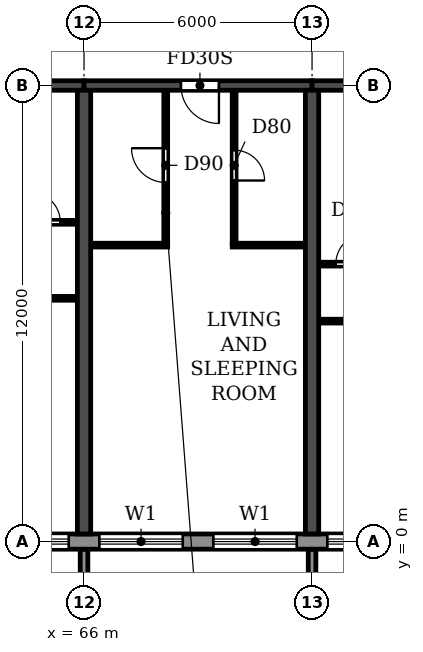
"""IFC4 building model, lengths in metres.
Left out: names, types, materials, properties, quantities, classifications, styles, units other than length and angle.
Written with IfcOpenShell. Run it as: python <this file> out.ifc"""

import sys

from ifc_helpers import new_model, si_unit, direction, frame, frame_2d, origin, place, context, subcontext, project, spatial, polyline, rectangle, outline, extrude, source, transform, mapped, element, fill, save


model = new_model("IFC4")
c1 = context("Model", 3, precision=1e-05, world=origin(), true_north=direction((0.0, 1.0)))
c2 = subcontext(c1, "Body", "Model", "MODEL_VIEW")
j1 = project(units=[si_unit("LENGTHUNIT", "METRE"), si_unit("PLANEANGLEUNIT", "RADIAN")], contexts=[c1])
p1 = place(None, origin())
s1 = spatial("IfcSite", under=j1, at=p1, CompositionType="ELEMENT")
p2 = place(p1, origin())
s2 = spatial("IfcBuilding", under=s1, at=p2, CompositionType="ELEMENT")
p3 = place(p2, frame((0.0, 0.0, 76.2)))
s3 = spatial("IfcBuildingStorey", under=s2, at=p3, CompositionType="ELEMENT", Elevation=76.2)
for number, where, z_axis, x_axis in (
    (1, (66.0, 0.2, 0.0), (0.0, 0.0, 1.0), (0.0, 1.0, 0.0)),
    (2, (72.0, 0.2, 0.0), (0.0, 0.0, 1.0), (0.0, 1.0, 0.0)),
):
    element("IfcWall", number, at=place(p3, frame(where, z_axis=z_axis, x_axis=x_axis)), inside=s3, PredefinedType="SHEAR", context=c2, shape_type="SweptSolid", body=[
        extrude(rectangle(XDim=11.675, YDim=0.35, at=frame_2d((5.837, 0.0))), origin(), (0.0, 0.0, 1.0), 3.06),
    ])
p4 = place(p3, frame((60.0, 12.0, 0.0), z_axis=(0.0, 0.0, 1.0), x_axis=(1.0, 0.0, 0.0)))
e3 = element("IfcWall", 3, at=p4, inside=s3, PredefinedType="SHEAR", context=c2, shape_type="SweptSolid", body=[
    extrude(rectangle(XDim=6.0, YDim=0.25, at=frame_2d((3.0, 0.0))), origin(), (0.0, 0.0, 1.0), 2.46),
])
p5 = place(p4, frame((2.55, 0.0, 0.0)))
e4 = element("IfcOpeningElement", 4, at=p5, cuts=e3, PredefinedType="OPENING", context=c2, shape_type="SweptSolid", body=[
    extrude(rectangle(XDim=1.0, YDim=2.1, at=frame_2d((0.5, 1.05))), frame((0.0, 0.135, 0.0), z_axis=(0.0, -1.0, 0.0), x_axis=(1.0, 0.0, 0.0)), (0.0, 0.0, 1.0), 0.27),
])
p6 = place(p3, frame((66.0, 12.0, 0.0), z_axis=(0.0, 0.0, 1.0), x_axis=(1.0, 0.0, 0.0)))
e5 = element("IfcWall", 5, at=p6, inside=s3, PredefinedType="SHEAR", context=c2, shape_type="SweptSolid", body=[
    extrude(rectangle(XDim=6.0, YDim=0.25, at=frame_2d((3.0, 0.0))), origin(), (0.0, 0.0, 1.0), 2.46),
])
p7 = place(p6, frame((2.55, 0.0, 0.0)))
e6 = element("IfcOpeningElement", 6, at=p7, cuts=e5, PredefinedType="OPENING", context=c2, shape_type="SweptSolid", body=[
    extrude(rectangle(XDim=1.0, YDim=2.1, at=frame_2d((0.5, 1.05))), frame((0.0, 0.135, 0.0), z_axis=(0.0, -1.0, 0.0), x_axis=(1.0, 0.0, 0.0)), (0.0, 0.0, 1.0), 0.27),
])
p8 = place(p3, frame((72.0, 12.0, 0.0), z_axis=(0.0, 0.0, 1.0), x_axis=(1.0, 0.0, 0.0)))
e7 = element("IfcWall", 7, at=p8, inside=s3, PredefinedType="SHEAR", context=c2, shape_type="SweptSolid", body=[
    extrude(rectangle(XDim=6.0, YDim=0.25, at=frame_2d((3.0, 0.0))), origin(), (0.0, 0.0, 1.0), 2.46),
])
p9 = place(p8, frame((2.45, 0.0, 0.0)))
e8 = element("IfcOpeningElement", 8, at=p9, cuts=e7, PredefinedType="OPENING", context=c2, shape_type="SweptSolid", body=[
    extrude(rectangle(XDim=1.0, YDim=2.1, at=frame_2d((0.5, 1.05))), frame((0.0, 0.135, 0.0), z_axis=(0.0, -1.0, 0.0), x_axis=(1.0, 0.0, 0.0)), (0.0, 0.0, 1.0), 0.27),
])
p10 = place(p3, frame((10.683, 0.0, 0.0), z_axis=(0.0, 0.0, 1.0), x_axis=(1.0, 0.0, 0.0)))
e9 = element("IfcWall", 9, at=p10, inside=s3, PredefinedType="STANDARD", context=c2, shape_type="SweptSolid", body=[
    extrude(rectangle(XDim=80.634, YDim=0.4, at=frame_2d((40.317, 0.0))), origin(), (0.0, 0.0, 1.0), 3.06),
])
p11 = place(p10, frame((1.717, 0.0, 0.9)))
e10 = element("IfcOpeningElement", 10, at=p11, cuts=e9, PredefinedType="OPENING", context=c2, shape_type="SweptSolid", body=[
    extrude(rectangle(XDim=2.2, YDim=1.5, at=frame_2d((1.1, 0.75))), frame((0.0, 0.21, 0.0), z_axis=(0.0, -1.0, 0.0), x_axis=(1.0, 0.0, 0.0)), (0.0, 0.0, 1.0), 0.42),
])
p12 = place(p10, frame((4.917, 0.0, 0.0)))
e11 = element("IfcOpeningElement", 11, at=p12, cuts=e9, PredefinedType="OPENING", context=c2, shape_type="SweptSolid", body=[
    extrude(rectangle(XDim=1.8, YDim=2.4, at=frame_2d((0.9, 1.2))), frame((0.0, 0.21, 0.0), z_axis=(0.0, -1.0, 0.0), x_axis=(1.0, 0.0, 0.0)), (0.0, 0.0, 1.0), 0.42),
])
p13 = place(p10, frame((7.717, 0.0, 0.9)))
e12 = element("IfcOpeningElement", 12, at=p13, cuts=e9, PredefinedType="OPENING", context=c2, shape_type="SweptSolid", body=[
    extrude(rectangle(XDim=2.2, YDim=1.5, at=frame_2d((1.1, 0.75))), frame((0.0, 0.21, 0.0), z_axis=(0.0, -1.0, 0.0), x_axis=(1.0, 0.0, 0.0)), (0.0, 0.0, 1.0), 0.42),
])
p14 = place(p10, frame((10.717, 0.0, 0.9)))
e13 = element("IfcOpeningElement", 13, at=p14, cuts=e9, PredefinedType="OPENING", context=c2, shape_type="SweptSolid", body=[
    extrude(rectangle(XDim=2.2, YDim=1.5, at=frame_2d((1.1, 0.75))), frame((0.0, 0.21, 0.0), z_axis=(0.0, -1.0, 0.0), x_axis=(1.0, 0.0, 0.0)), (0.0, 0.0, 1.0), 0.42),
])
p15 = place(p10, frame((13.717, 0.0, 0.9)))
e14 = element("IfcOpeningElement", 14, at=p15, cuts=e9, PredefinedType="OPENING", context=c2, shape_type="SweptSolid", body=[
    extrude(rectangle(XDim=2.2, YDim=1.5, at=frame_2d((1.1, 0.75))), frame((0.0, 0.21, 0.0), z_axis=(0.0, -1.0, 0.0), x_axis=(1.0, 0.0, 0.0)), (0.0, 0.0, 1.0), 0.42),
])
p16 = place(p10, frame((16.917, 0.0, 0.0)))
e15 = element("IfcOpeningElement", 15, at=p16, cuts=e9, PredefinedType="OPENING", context=c2, shape_type="SweptSolid", body=[
    extrude(rectangle(XDim=1.8, YDim=2.4, at=frame_2d((0.9, 1.2))), frame((0.0, 0.21, 0.0), z_axis=(0.0, -1.0, 0.0), x_axis=(1.0, 0.0, 0.0)), (0.0, 0.0, 1.0), 0.42),
])
p17 = place(p10, frame((19.717, 0.0, 0.9)))
e16 = element("IfcOpeningElement", 16, at=p17, cuts=e9, PredefinedType="OPENING", context=c2, shape_type="SweptSolid", body=[
    extrude(rectangle(XDim=2.2, YDim=1.5, at=frame_2d((1.1, 0.75))), frame((0.0, 0.21, 0.0), z_axis=(0.0, -1.0, 0.0), x_axis=(1.0, 0.0, 0.0)), (0.0, 0.0, 1.0), 0.42),
])
p18 = place(p10, frame((22.717, 0.0, 0.9)))
e17 = element("IfcOpeningElement", 17, at=p18, cuts=e9, PredefinedType="OPENING", context=c2, shape_type="SweptSolid", body=[
    extrude(rectangle(XDim=2.2, YDim=1.5, at=frame_2d((1.1, 0.75))), frame((0.0, 0.21, 0.0), z_axis=(0.0, -1.0, 0.0), x_axis=(1.0, 0.0, 0.0)), (0.0, 0.0, 1.0), 0.42),
])
p19 = place(p10, frame((25.917, 0.0, 0.0)))
e18 = element("IfcOpeningElement", 18, at=p19, cuts=e9, PredefinedType="OPENING", context=c2, shape_type="SweptSolid", body=[
    extrude(rectangle(XDim=1.8, YDim=2.4, at=frame_2d((0.9, 1.2))), frame((0.0, 0.21, 0.0), z_axis=(0.0, -1.0, 0.0), x_axis=(1.0, 0.0, 0.0)), (0.0, 0.0, 1.0), 0.42),
])
p20 = place(p10, frame((28.717, 0.0, 0.9)))
e19 = element("IfcOpeningElement", 19, at=p20, cuts=e9, PredefinedType="OPENING", context=c2, shape_type="SweptSolid", body=[
    extrude(rectangle(XDim=2.2, YDim=1.5, at=frame_2d((1.1, 0.75))), frame((0.0, 0.21, 0.0), z_axis=(0.0, -1.0, 0.0), x_axis=(1.0, 0.0, 0.0)), (0.0, 0.0, 1.0), 0.42),
])
p21 = place(p10, frame((31.717, 0.0, 0.9)))
e20 = element("IfcOpeningElement", 20, at=p21, cuts=e9, PredefinedType="OPENING", context=c2, shape_type="SweptSolid", body=[
    extrude(rectangle(XDim=2.2, YDim=1.5, at=frame_2d((1.1, 0.75))), frame((0.0, 0.21, 0.0), z_axis=(0.0, -1.0, 0.0), x_axis=(1.0, 0.0, 0.0)), (0.0, 0.0, 1.0), 0.42),
])
p22 = place(p10, frame((34.717, 0.0, 0.9)))
e21 = element("IfcOpeningElement", 21, at=p22, cuts=e9, PredefinedType="OPENING", context=c2, shape_type="SweptSolid", body=[
    extrude(rectangle(XDim=2.2, YDim=1.5, at=frame_2d((1.1, 0.75))), frame((0.0, 0.21, 0.0), z_axis=(0.0, -1.0, 0.0), x_axis=(1.0, 0.0, 0.0)), (0.0, 0.0, 1.0), 0.42),
])
p23 = place(p10, frame((37.917, 0.0, 0.0)))
e22 = element("IfcOpeningElement", 22, at=p23, cuts=e9, PredefinedType="OPENING", context=c2, shape_type="SweptSolid", body=[
    extrude(rectangle(XDim=1.8, YDim=2.4, at=frame_2d((0.9, 1.2))), frame((0.0, 0.21, 0.0), z_axis=(0.0, -1.0, 0.0), x_axis=(1.0, 0.0, 0.0)), (0.0, 0.0, 1.0), 0.42),
])
p24 = place(p10, frame((40.717, 0.0, 0.9)))
e23 = element("IfcOpeningElement", 23, at=p24, cuts=e9, PredefinedType="OPENING", context=c2, shape_type="SweptSolid", body=[
    extrude(rectangle(XDim=2.2, YDim=1.5, at=frame_2d((1.1, 0.75))), frame((0.0, 0.21, 0.0), z_axis=(0.0, -1.0, 0.0), x_axis=(1.0, 0.0, 0.0)), (0.0, 0.0, 1.0), 0.42),
])
p25 = place(p10, frame((43.717, 0.0, 0.9)))
e24 = element("IfcOpeningElement", 24, at=p25, cuts=e9, PredefinedType="OPENING", context=c2, shape_type="SweptSolid", body=[
    extrude(rectangle(XDim=2.2, YDim=1.5, at=frame_2d((1.1, 0.75))), frame((0.0, 0.21, 0.0), z_axis=(0.0, -1.0, 0.0), x_axis=(1.0, 0.0, 0.0)), (0.0, 0.0, 1.0), 0.42),
])
p26 = place(p10, frame((46.717, 0.0, 0.9)))
e25 = element("IfcOpeningElement", 25, at=p26, cuts=e9, PredefinedType="OPENING", context=c2, shape_type="SweptSolid", body=[
    extrude(rectangle(XDim=2.2, YDim=1.5, at=frame_2d((1.1, 0.75))), frame((0.0, 0.21, 0.0), z_axis=(0.0, -1.0, 0.0), x_axis=(1.0, 0.0, 0.0)), (0.0, 0.0, 1.0), 0.42),
])
p27 = place(p10, frame((49.917, 0.0, 0.0)))
e26 = element("IfcOpeningElement", 26, at=p27, cuts=e9, PredefinedType="OPENING", context=c2, shape_type="SweptSolid", body=[
    extrude(rectangle(XDim=1.8, YDim=2.4, at=frame_2d((0.9, 1.2))), frame((0.0, 0.21, 0.0), z_axis=(0.0, -1.0, 0.0), x_axis=(1.0, 0.0, 0.0)), (0.0, 0.0, 1.0), 0.42),
])
p28 = place(p10, frame((52.717, 0.0, 0.9)))
e27 = element("IfcOpeningElement", 27, at=p28, cuts=e9, PredefinedType="OPENING", context=c2, shape_type="SweptSolid", body=[
    extrude(rectangle(XDim=2.2, YDim=1.5, at=frame_2d((1.1, 0.75))), frame((0.0, 0.21, 0.0), z_axis=(0.0, -1.0, 0.0), x_axis=(1.0, 0.0, 0.0)), (0.0, 0.0, 1.0), 0.42),
])
p29 = place(p10, frame((55.717, 0.0, 0.9)))
e28 = element("IfcOpeningElement", 28, at=p29, cuts=e9, PredefinedType="OPENING", context=c2, shape_type="SweptSolid", body=[
    extrude(rectangle(XDim=2.2, YDim=1.5, at=frame_2d((1.1, 0.75))), frame((0.0, 0.21, 0.0), z_axis=(0.0, -1.0, 0.0), x_axis=(1.0, 0.0, 0.0)), (0.0, 0.0, 1.0), 0.42),
])
p30 = place(p10, frame((58.717, 0.0, 0.9)))
e29 = element("IfcOpeningElement", 29, at=p30, cuts=e9, PredefinedType="OPENING", context=c2, shape_type="SweptSolid", body=[
    extrude(rectangle(XDim=2.2, YDim=1.5, at=frame_2d((1.1, 0.75))), frame((0.0, 0.21, 0.0), z_axis=(0.0, -1.0, 0.0), x_axis=(1.0, 0.0, 0.0)), (0.0, 0.0, 1.0), 0.42),
])
p31 = place(p10, frame((61.717, 0.0, 0.9)))
e30 = element("IfcOpeningElement", 30, at=p31, cuts=e9, PredefinedType="OPENING", context=c2, shape_type="SweptSolid", body=[
    extrude(rectangle(XDim=2.2, YDim=1.5, at=frame_2d((1.1, 0.75))), frame((0.0, 0.21, 0.0), z_axis=(0.0, -1.0, 0.0), x_axis=(1.0, 0.0, 0.0)), (0.0, 0.0, 1.0), 0.42),
])
p32 = place(p10, frame((64.917, 0.0, 0.0)))
e31 = element("IfcOpeningElement", 31, at=p32, cuts=e9, PredefinedType="OPENING", context=c2, shape_type="SweptSolid", body=[
    extrude(rectangle(XDim=1.8, YDim=2.4, at=frame_2d((0.9, 1.2))), frame((0.0, 0.21, 0.0), z_axis=(0.0, -1.0, 0.0), x_axis=(1.0, 0.0, 0.0)), (0.0, 0.0, 1.0), 0.42),
])
p33 = place(p10, frame((67.717, 0.0, 0.9)))
e32 = element("IfcOpeningElement", 32, at=p33, cuts=e9, PredefinedType="OPENING", context=c2, shape_type="SweptSolid", body=[
    extrude(rectangle(XDim=2.2, YDim=1.5, at=frame_2d((1.1, 0.75))), frame((0.0, 0.21, 0.0), z_axis=(0.0, -1.0, 0.0), x_axis=(1.0, 0.0, 0.0)), (0.0, 0.0, 1.0), 0.42),
])
p34 = place(p10, frame((70.717, 0.0, 0.9)))
e33 = element("IfcOpeningElement", 33, at=p34, cuts=e9, PredefinedType="OPENING", context=c2, shape_type="SweptSolid", body=[
    extrude(rectangle(XDim=2.2, YDim=1.5, at=frame_2d((1.1, 0.75))), frame((0.0, 0.21, 0.0), z_axis=(0.0, -1.0, 0.0), x_axis=(1.0, 0.0, 0.0)), (0.0, 0.0, 1.0), 0.42),
])
p35 = place(p10, frame((73.917, 0.0, 0.0)))
e34 = element("IfcOpeningElement", 34, at=p35, cuts=e9, PredefinedType="OPENING", context=c2, shape_type="SweptSolid", body=[
    extrude(rectangle(XDim=1.8, YDim=2.4, at=frame_2d((0.9, 1.2))), frame((0.0, 0.21, 0.0), z_axis=(0.0, -1.0, 0.0), x_axis=(1.0, 0.0, 0.0)), (0.0, 0.0, 1.0), 0.42),
])
p36 = place(p10, frame((76.717, 0.0, 0.9)))
e35 = element("IfcOpeningElement", 35, at=p36, cuts=e9, PredefinedType="OPENING", context=c2, shape_type="SweptSolid", body=[
    extrude(rectangle(XDim=2.2, YDim=1.5, at=frame_2d((1.1, 0.75))), frame((0.0, 0.21, 0.0), z_axis=(0.0, -1.0, 0.0), x_axis=(1.0, 0.0, 0.0)), (0.0, 0.0, 1.0), 0.42),
])
m1 = source(origin(), c2, "Body", "SweptSolid", [
    extrude(outline(polyline([(0.0, 0.0), (0.2, 0.0), (0.2, 1.65), (0.0, 1.65), (0.0, 0.0)])), origin(), (0.0, 0.0, 1.0), 3.1),
])
for number, where in (
    (36, (65.9, -1.85, 0.0)),
    (37, (71.9, -1.85, 0.0)),
):
    element("IfcWall", number, at=place(p3, frame(where)), inside=s3, PredefinedType="STANDARD", context=c2, shape_type="MappedRepresentation", body=[
        mapped(m1, transform((0.0, 0.0, 0.0))),
    ])
p37 = place(p3, frame((72.185, 5.8, 0.0), z_axis=(0.0, 0.0, 1.0), x_axis=(1.0, 0.0, 0.0)))
e38 = element("IfcWall", 38, at=p37, inside=s3, PredefinedType="PARTITIONING", context=c2, shape_type="SweptSolid", body=[
    extrude(rectangle(XDim=2.865, YDim=0.1, at=frame_2d((1.433, 0.0))), origin(), (0.0, 0.0, 1.0), 3.06),
])
p38 = place(p37, frame((1.415, 0.0, 0.0)))
e39 = element("IfcOpeningElement", 39, at=p38, cuts=e38, PredefinedType="OPENING", context=c2, shape_type="SweptSolid", body=[
    extrude(rectangle(XDim=0.9, YDim=2.1, at=frame_2d((0.45, 1.05))), frame((0.0, 0.06, 0.0), z_axis=(0.0, -1.0, 0.0), x_axis=(1.0, 0.0, 0.0)), (0.0, 0.0, 1.0), 0.12),
])
p39 = place(p3, frame((62.95, 6.4, 0.0), z_axis=(0.0, 0.0, 1.0), x_axis=(1.0, 0.0, 0.0)))
e40 = element("IfcWall", 40, at=p39, inside=s3, PredefinedType="PARTITIONING", context=c2, shape_type="SweptSolid", body=[
    extrude(rectangle(XDim=2.865, YDim=0.1, at=frame_2d((1.433, 0.0))), origin(), (0.0, 0.0, 1.0), 3.06),
])
p40 = place(p39, frame((0.55, 0.0, 0.0)))
e41 = element("IfcOpeningElement", 41, at=p40, cuts=e40, PredefinedType="OPENING", context=c2, shape_type="SweptSolid", body=[
    extrude(rectangle(XDim=0.9, YDim=2.1, at=frame_2d((0.45, 1.05))), frame((0.0, 0.06, 0.0), z_axis=(0.0, -1.0, 0.0), x_axis=(1.0, 0.0, 0.0)), (0.0, 0.0, 1.0), 0.12),
])
p41 = place(p3, frame((72.185, 7.3, 0.0), z_axis=(0.0, 0.0, 1.0), x_axis=(1.0, 0.0, 0.0)))
e42 = element("IfcWall", 42, at=p41, inside=s3, PredefinedType="PARTITIONING", context=c2, shape_type="SweptSolid", body=[
    extrude(rectangle(XDim=1.915, YDim=0.1, at=frame_2d((0.958, 0.0))), origin(), (0.0, 0.0, 1.0), 3.06),
])
p42 = place(p41, frame((0.44, 0.0, 0.0)))
e43 = element("IfcOpeningElement", 43, at=p42, cuts=e42, PredefinedType="OPENING", context=c2, shape_type="SweptSolid", body=[
    extrude(rectangle(XDim=0.8, YDim=2.1, at=frame_2d((0.4, 1.05))), frame((0.0, 0.06, 0.0), z_axis=(0.0, -1.0, 0.0), x_axis=(1.0, 0.0, 0.0)), (0.0, 0.0, 1.0), 0.12),
])
p43 = place(p3, frame((66.185, 7.8, 0.0), z_axis=(0.0, 0.0, 1.0), x_axis=(1.0, 0.0, 0.0)))
e44 = element("IfcWall", 44, at=p43, inside=s3, PredefinedType="PARTITIONING", context=c2, shape_type="SweptSolid", body=[
    extrude(rectangle(XDim=2.015, YDim=0.1, at=frame_2d((1.007, 0.0))), origin(), (0.0, 0.0, 1.0), 3.06),
])
p44 = place(p3, frame((69.9, 7.8, 0.0), z_axis=(0.0, 0.0, 1.0), x_axis=(1.0, 0.0, 0.0)))
e45 = element("IfcWall", 45, at=p44, inside=s3, PredefinedType="PARTITIONING", context=c2, shape_type="SweptSolid", body=[
    extrude(rectangle(XDim=1.915, YDim=0.1, at=frame_2d((0.958, 0.0))), origin(), (0.0, 0.0, 1.0), 3.06),
])
p45 = place(p3, frame((63.9, 8.4, 0.0), z_axis=(0.0, 0.0, 1.0), x_axis=(1.0, 0.0, 0.0)))
e46 = element("IfcWall", 46, at=p45, inside=s3, PredefinedType="PARTITIONING", context=c2, shape_type="SweptSolid", body=[
    extrude(rectangle(XDim=1.915, YDim=0.1, at=frame_2d((0.958, 0.0))), origin(), (0.0, 0.0, 1.0), 3.06),
])
p46 = place(p45, frame((0.675, 0.0, 0.0)))
e47 = element("IfcOpeningElement", 47, at=p46, cuts=e46, PredefinedType="OPENING", context=c2, shape_type="SweptSolid", body=[
    extrude(rectangle(XDim=0.8, YDim=2.1, at=frame_2d((0.4, 1.05))), frame((0.0, 0.06, 0.0), z_axis=(0.0, -1.0, 0.0), x_axis=(1.0, 0.0, 0.0)), (0.0, 0.0, 1.0), 0.12),
])
p47 = place(p3, frame((68.15, 7.85, 0.0), z_axis=(0.0, 0.0, 1.0), x_axis=(0.0, 1.0, 0.0)))
e48 = element("IfcWall", 48, at=p47, inside=s3, PredefinedType="PARTITIONING", context=c2, shape_type="SweptSolid", body=[
    extrude(rectangle(XDim=4.015, YDim=0.1, at=frame_2d((2.007, 0.0))), origin(), (0.0, 0.0, 1.0), 3.06),
])
p48 = place(p47, frame((1.6, 0.0, 0.0)))
e49 = element("IfcOpeningElement", 49, at=p48, cuts=e48, PredefinedType="OPENING", context=c2, shape_type="SweptSolid", body=[
    extrude(rectangle(XDim=0.9, YDim=2.1, at=frame_2d((0.45, 1.05))), frame((0.0, 0.06, 0.0), z_axis=(0.0, -1.0, 0.0), x_axis=(1.0, 0.0, 0.0)), (0.0, 0.0, 1.0), 0.12),
])
p49 = place(p3, frame((69.95, 7.85, 0.0), z_axis=(0.0, 0.0, 1.0), x_axis=(0.0, 1.0, 0.0)))
e50 = element("IfcWall", 50, at=p49, inside=s3, PredefinedType="PARTITIONING", context=c2, shape_type="SweptSolid", body=[
    extrude(rectangle(XDim=4.015, YDim=0.1, at=frame_2d((2.007, 0.0))), origin(), (0.0, 0.0, 1.0), 3.06),
])
p50 = place(p49, frame((1.65, 0.0, 0.0)))
e51 = element("IfcOpeningElement", 51, at=p50, cuts=e50, PredefinedType="OPENING", context=c2, shape_type="SweptSolid", body=[
    extrude(rectangle(XDim=0.8, YDim=2.1, at=frame_2d((0.4, 1.05))), frame((0.0, 0.06, 0.0), z_axis=(0.0, -1.0, 0.0), x_axis=(1.0, 0.0, 0.0)), (0.0, 0.0, 1.0), 0.12),
])
p51 = place(p28, origin())
e52 = element("IfcWindow", 52, at=p51, inside=s3, PartitioningType="DOUBLE_PANEL_HORIZONTAL", PredefinedType="WINDOW", context=c2, shape_type="SweptSolid", body=[
    extrude(rectangle(XDim=2.2, YDim=1.5, at=frame_2d((1.1, 0.75))), frame((0.0, 0.03, 0.0), z_axis=(0.0, -1.0, 0.0), x_axis=(1.0, 0.0, 0.0)), (0.0, 0.0, 1.0), 0.06),
])
fill(e27, e52)
p52 = place(p29, origin())
e53 = element("IfcWindow", 53, at=p52, inside=s3, PartitioningType="DOUBLE_PANEL_HORIZONTAL", PredefinedType="WINDOW", context=c2, shape_type="SweptSolid", body=[
    extrude(rectangle(XDim=2.2, YDim=1.5, at=frame_2d((1.1, 0.75))), frame((0.0, 0.03, 0.0), z_axis=(0.0, -1.0, 0.0), x_axis=(1.0, 0.0, 0.0)), (0.0, 0.0, 1.0), 0.06),
])
fill(e28, e53)
p53 = place(p30, origin())
e54 = element("IfcWindow", 54, at=p53, inside=s3, PartitioningType="DOUBLE_PANEL_HORIZONTAL", PredefinedType="WINDOW", context=c2, shape_type="SweptSolid", body=[
    extrude(rectangle(XDim=2.2, YDim=1.5, at=frame_2d((1.1, 0.75))), frame((0.0, 0.03, 0.0), z_axis=(0.0, -1.0, 0.0), x_axis=(1.0, 0.0, 0.0)), (0.0, 0.0, 1.0), 0.06),
])
fill(e29, e54)
p54 = place(p31, origin())
e55 = element("IfcWindow", 55, at=p54, inside=s3, PartitioningType="DOUBLE_PANEL_HORIZONTAL", PredefinedType="WINDOW", context=c2, shape_type="SweptSolid", body=[
    extrude(rectangle(XDim=2.2, YDim=1.5, at=frame_2d((1.1, 0.75))), frame((0.0, 0.03, 0.0), z_axis=(0.0, -1.0, 0.0), x_axis=(1.0, 0.0, 0.0)), (0.0, 0.0, 1.0), 0.06),
])
fill(e30, e55)
p55 = place(p46, origin())
e56 = element("IfcDoor", 56, at=p55, inside=s3, OperationType="SINGLE_SWING_LEFT", PredefinedType="DOOR", context=c2, shape_type="SweptSolid", body=[
    extrude(rectangle(XDim=0.8, YDim=2.1, at=frame_2d((0.4, 1.05))), frame((0.0, 0.025, 0.0), z_axis=(0.0, -1.0, 0.0), x_axis=(1.0, 0.0, 0.0)), (0.0, 0.0, 1.0), 0.05),
])
fill(e47, e56)
p56 = place(p48, origin())
e57 = element("IfcDoor", 57, at=p56, inside=s3, OperationType="SINGLE_SWING_RIGHT", PredefinedType="DOOR", context=c2, shape_type="SweptSolid", body=[
    extrude(rectangle(XDim=0.9, YDim=2.1, at=frame_2d((0.45, 1.05))), frame((0.0, 0.025, 0.0), z_axis=(0.0, -1.0, 0.0), x_axis=(1.0, 0.0, 0.0)), (0.0, 0.0, 1.0), 0.05),
])
fill(e49, e57)
p57 = place(p7, frame((1.0, 0.0, 0.0), z_axis=(0.0, 0.0, 1.0), x_axis=(-1.0, 0.0, 0.0)))
e58 = element("IfcDoor", 58, at=p57, inside=s3, OperationType="SINGLE_SWING_LEFT", PredefinedType="DOOR", context=c2, shape_type="SweptSolid", body=[
    extrude(rectangle(XDim=1.0, YDim=2.1, at=frame_2d((0.5, 1.05))), frame((0.0, 0.025, 0.0), z_axis=(0.0, -1.0, 0.0), x_axis=(1.0, 0.0, 0.0)), (0.0, 0.0, 1.0), 0.05),
])
fill(e6, e58)
p58 = place(p50, frame((0.8, 0.0, 0.0), z_axis=(0.0, 0.0, 1.0), x_axis=(-1.0, 0.0, 0.0)))
e59 = element("IfcDoor", 59, at=p58, inside=s3, OperationType="SINGLE_SWING_RIGHT", PredefinedType="DOOR", context=c2, shape_type="SweptSolid", body=[
    extrude(rectangle(XDim=0.8, YDim=2.1, at=frame_2d((0.4, 1.05))), frame((0.0, 0.025, 0.0), z_axis=(0.0, -1.0, 0.0), x_axis=(1.0, 0.0, 0.0)), (0.0, 0.0, 1.0), 0.05),
])
fill(e51, e59)
p59 = place(p42, origin())
e60 = element("IfcDoor", 60, at=p59, inside=s3, OperationType="SINGLE_SWING_RIGHT", PredefinedType="DOOR", context=c2, shape_type="SweptSolid", body=[
    extrude(rectangle(XDim=0.8, YDim=2.1, at=frame_2d((0.4, 1.05))), frame((0.0, 0.025, 0.0), z_axis=(0.0, -1.0, 0.0), x_axis=(1.0, 0.0, 0.0)), (0.0, 0.0, 1.0), 0.05),
])
fill(e43, e60)
save(model, sys.argv[1])
